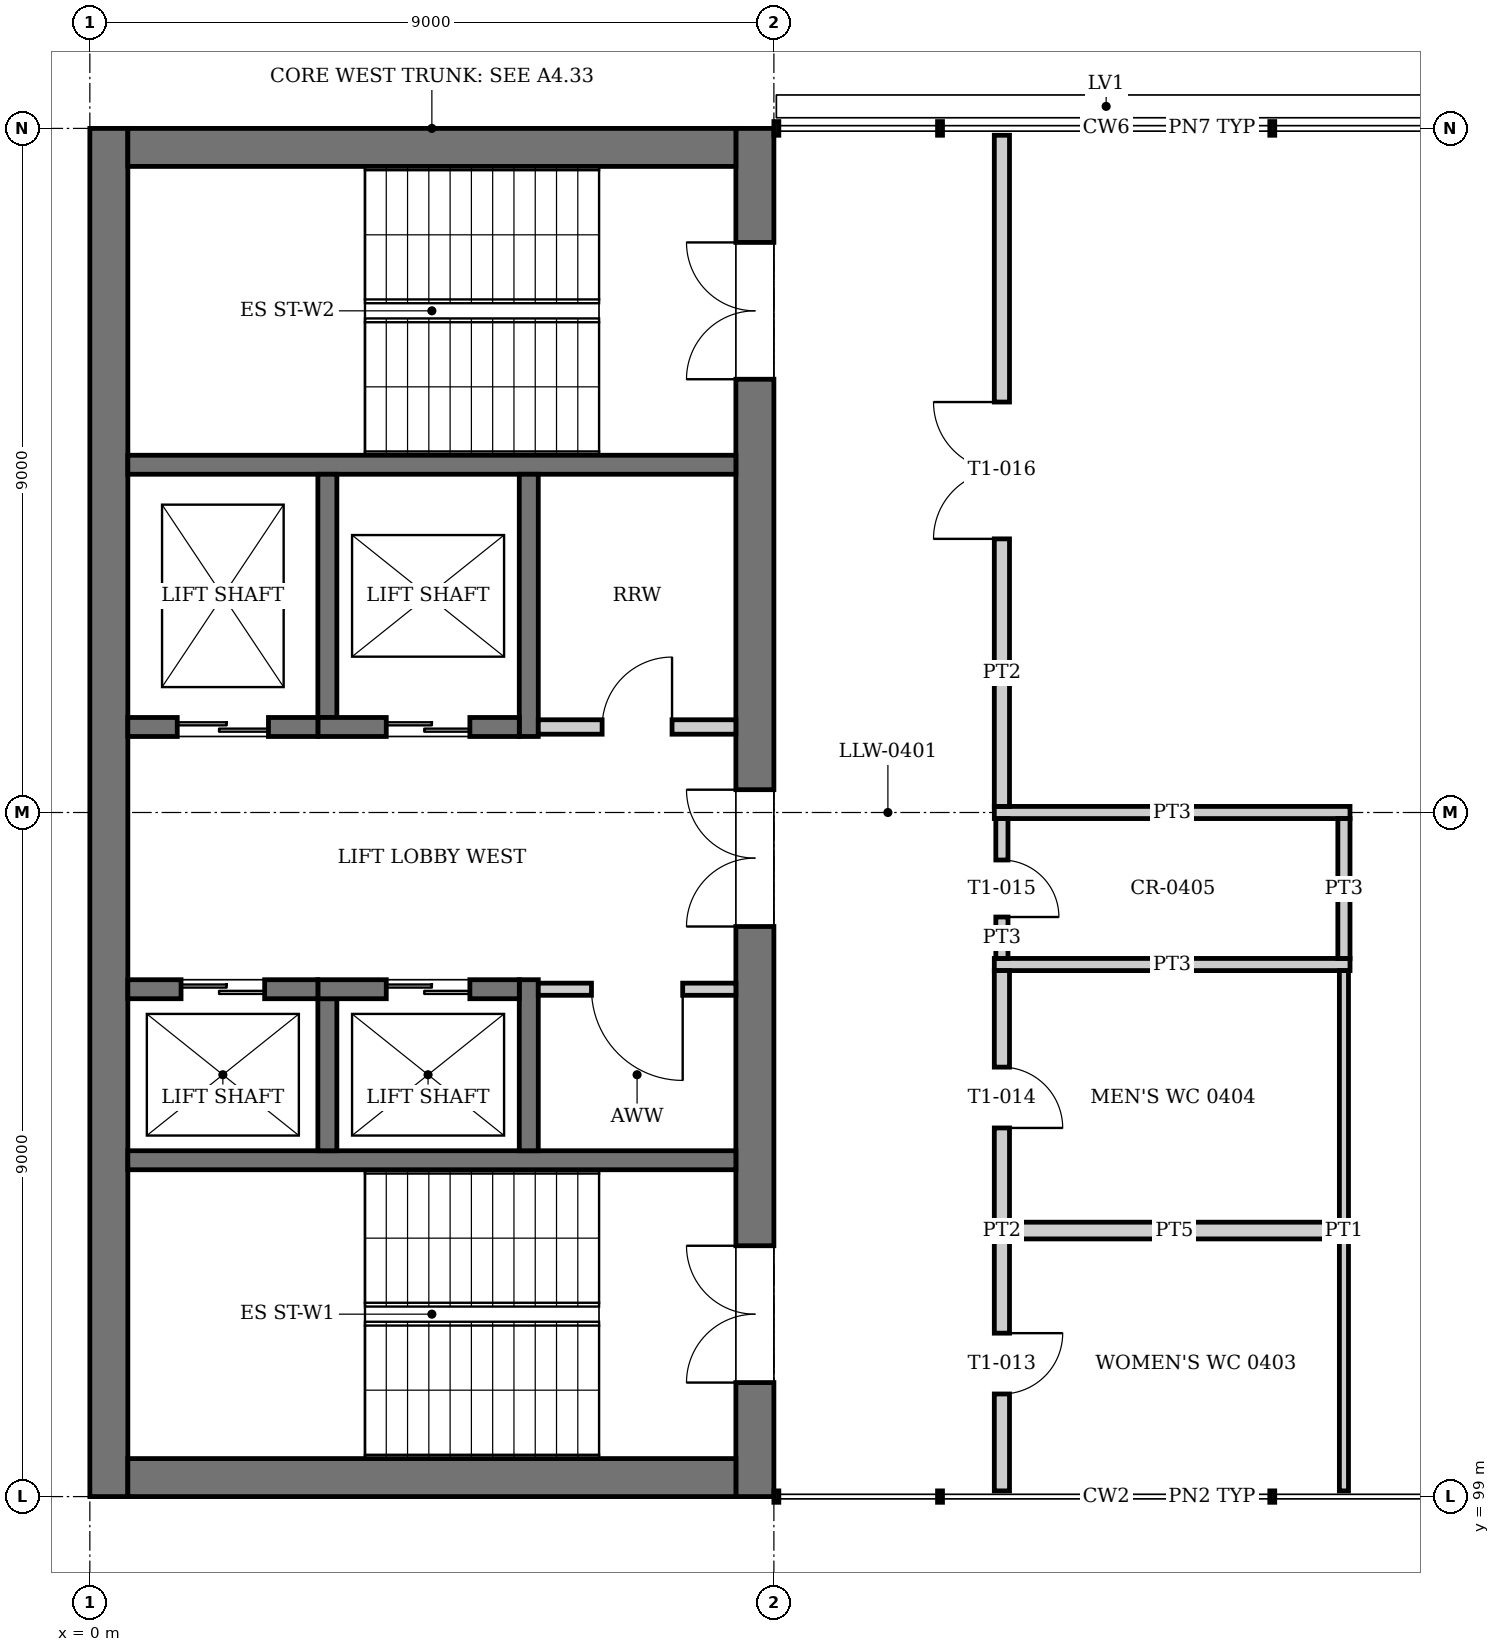
"""IFC4 building model, lengths in metres.
Left out: names, types, materials, properties, quantities, classifications, styles, units other than length and angle.
Written with IfcOpenShell. Run it as: python <this file> out.ifc"""

import sys

from ifc_helpers import new_model, si_unit, direction, frame, frame_2d, origin, place, context, subcontext, project, spatial, rectangle, extrude, element, fill, save


model = new_model("IFC4")
c1 = context("Model", 3, precision=1e-05, world=origin(), true_north=direction((0.0, 1.0)))
c2 = subcontext(c1, "Body", "Model", "MODEL_VIEW")
j1 = project(units=[si_unit("LENGTHUNIT", "METRE"), si_unit("PLANEANGLEUNIT", "RADIAN")], contexts=[c1])
p1 = place(None, origin())
s1 = spatial("IfcSite", under=j1, at=p1, CompositionType="ELEMENT")
p2 = place(p1, origin())
s2 = spatial("IfcBuilding", under=s1, at=p2, CompositionType="ELEMENT")
p3 = place(p2, frame((0.0, 0.0, 19.2)))
s3 = spatial("IfcBuildingStorey", under=s2, at=p3, CompositionType="ELEMENT", Elevation=19.2)
p4 = place(p3, frame((0.25, 99.0, 0.0), z_axis=(0.0, 0.0, 1.0), x_axis=(0.0, 1.0, 0.0)))
e1 = element("IfcWall", 1, at=p4, inside=s3, PredefinedType="SHEAR", context=c2, shape_type="SweptSolid", body=[
    extrude(rectangle(XDim=18.0, YDim=0.5, at=frame_2d((9.0, 0.0))), origin(), (0.0, 0.0, 1.0), 4.0),
])
p5 = place(p3, frame((8.75, 99.0, 0.0), z_axis=(0.0, 0.0, 1.0), x_axis=(0.0, 1.0, 0.0)))
e2 = element("IfcWall", 2, at=p5, inside=s3, PredefinedType="SHEAR", context=c2, shape_type="SweptSolid", body=[
    extrude(rectangle(XDim=18.0, YDim=0.5, at=frame_2d((9.0, 0.0))), origin(), (0.0, 0.0, 1.0), 4.0),
])
p6 = place(p5, frame((1.5, 0.0, 0.0)))
e3 = element("IfcOpeningElement", 3, at=p6, cuts=e2, PredefinedType="OPENING", context=c2, shape_type="SweptSolid", body=[
    extrude(rectangle(XDim=1.8, YDim=2.1, at=frame_2d((0.9, 1.05))), frame((0.0, 0.26, 0.0), z_axis=(0.0, -1.0, 0.0), x_axis=(1.0, 0.0, 0.0)), (0.0, 0.0, 1.0), 0.52),
])
p7 = place(p5, frame((14.7, 0.0, 0.0)))
e4 = element("IfcOpeningElement", 4, at=p7, cuts=e2, PredefinedType="OPENING", context=c2, shape_type="SweptSolid", body=[
    extrude(rectangle(XDim=1.8, YDim=2.1, at=frame_2d((0.9, 1.05))), frame((0.0, 0.26, 0.0), z_axis=(0.0, -1.0, 0.0), x_axis=(1.0, 0.0, 0.0)), (0.0, 0.0, 1.0), 0.52),
])
p8 = place(p5, frame((7.5, 0.0, 0.0)))
e5 = element("IfcOpeningElement", 5, at=p8, cuts=e2, PredefinedType="OPENING", context=c2, shape_type="SweptSolid", body=[
    extrude(rectangle(XDim=1.8, YDim=2.1, at=frame_2d((0.9, 1.05))), frame((0.0, 0.26, 0.0), z_axis=(0.0, -1.0, 0.0), x_axis=(1.0, 0.0, 0.0)), (0.0, 0.0, 1.0), 0.52),
])
for number, where, z_axis, x_axis in (
    (6, (0.5, 99.25, 0.0), (0.0, 0.0, 1.0), (1.0, 0.0, 0.0)),
    (7, (0.5, 116.75, 0.0), (0.0, 0.0, 1.0), (1.0, 0.0, 0.0)),
):
    element("IfcWall", number, at=place(p3, frame(where, z_axis=z_axis, x_axis=x_axis)), inside=s3, PredefinedType="SHEAR", context=c2, shape_type="SweptSolid", body=[
        extrude(rectangle(XDim=8.0, YDim=0.5, at=frame_2d((4.0, 0.0))), origin(), (0.0, 0.0, 1.0), 4.0),
    ])
for number, where, z_axis, x_axis in (
    (8, (8.5, 103.425, 0.0), (0.0, 0.0, 1.0), (-1.0, 0.0, 0.0)),
    (9, (8.5, 112.575, 0.0), (0.0, 0.0, 1.0), (-1.0, 0.0, 0.0)),
):
    element("IfcWall", number, at=place(p3, frame(where, z_axis=z_axis, x_axis=x_axis)), inside=s3, PredefinedType="SOLIDWALL", context=c2, shape_type="SweptSolid", body=[
        extrude(rectangle(XDim=8.0, YDim=0.25, at=frame_2d((4.0, 0.0))), origin(), (0.0, 0.0, 1.0), 3.75),
    ])
p9 = place(p3, frame((5.775, 103.55, 0.0), z_axis=(0.0, 0.0, 1.0), x_axis=(0.0, 1.0, 0.0)))
e10 = element("IfcWall", 10, at=p9, inside=s3, PredefinedType="SOLIDWALL", context=c2, shape_type="SweptSolid", body=[
    extrude(rectangle(XDim=2.25, YDim=0.25, at=frame_2d((1.125, 0.0))), origin(), (0.0, 0.0, 1.0), 4.0),
])
p10 = place(p3, frame((3.125, 103.55, 0.0), z_axis=(0.0, 0.0, 1.0), x_axis=(0.0, 1.0, 0.0)))
e11 = element("IfcWall", 11, at=p10, inside=s3, PredefinedType="SOLIDWALL", context=c2, shape_type="SweptSolid", body=[
    extrude(rectangle(XDim=2.0, YDim=0.25, at=frame_2d((1.0, 0.0))), origin(), (0.0, 0.0, 1.0), 4.0),
])
p11 = place(p3, frame((5.65, 105.675, 0.0), z_axis=(0.0, 0.0, 1.0), x_axis=(-1.0, 0.0, 0.0)))
e12 = element("IfcWall", 12, at=p11, inside=s3, PredefinedType="SOLIDWALL", context=c2, shape_type="SweptSolid", body=[
    extrude(rectangle(XDim=2.65, YDim=0.25, at=frame_2d((1.325, 0.0))), origin(), (0.0, 0.0, 1.0), 4.0),
])
p12 = place(p11, frame((0.65, 0.0, 0.0)))
e13 = element("IfcOpeningElement", 13, at=p12, cuts=e12, PredefinedType="OPENING", context=c2, shape_type="SweptSolid", body=[
    extrude(rectangle(XDim=1.1, YDim=2.1, at=frame_2d((0.55, 1.05))), frame((0.0, 0.135, 0.0), z_axis=(0.0, -1.0, 0.0), x_axis=(1.0, 0.0, 0.0)), (0.0, 0.0, 1.0), 0.27),
])
p13 = place(p3, frame((3.0, 105.675, 0.0), z_axis=(0.0, 0.0, 1.0), x_axis=(-1.0, 0.0, 0.0)))
e14 = element("IfcWall", 14, at=p13, inside=s3, PredefinedType="SOLIDWALL", context=c2, shape_type="SweptSolid", body=[
    extrude(rectangle(XDim=2.5, YDim=0.25, at=frame_2d((1.25, 0.0))), origin(), (0.0, 0.0, 1.0), 4.0),
])
p14 = place(p13, frame((0.7, 0.0, 0.0)))
e15 = element("IfcOpeningElement", 15, at=p14, cuts=e14, PredefinedType="OPENING", context=c2, shape_type="SweptSolid", body=[
    extrude(rectangle(XDim=1.1, YDim=2.1, at=frame_2d((0.55, 1.05))), frame((0.0, 0.135, 0.0), z_axis=(0.0, -1.0, 0.0), x_axis=(1.0, 0.0, 0.0)), (0.0, 0.0, 1.0), 0.27),
])
p15 = place(p3, frame((5.775, 109.0, 0.0), z_axis=(0.0, 0.0, 1.0), x_axis=(0.0, 1.0, 0.0)))
e16 = element("IfcWall", 16, at=p15, inside=s3, PredefinedType="SOLIDWALL", context=c2, shape_type="SweptSolid", body=[
    extrude(rectangle(XDim=3.45, YDim=0.25, at=frame_2d((1.725, 0.0))), origin(), (0.0, 0.0, 1.0), 4.0),
])
p16 = place(p3, frame((3.125, 109.25, 0.0), z_axis=(0.0, 0.0, 1.0), x_axis=(0.0, 1.0, 0.0)))
e17 = element("IfcWall", 17, at=p16, inside=s3, PredefinedType="SOLIDWALL", context=c2, shape_type="SweptSolid", body=[
    extrude(rectangle(XDim=3.2, YDim=0.25, at=frame_2d((1.6, 0.0))), origin(), (0.0, 0.0, 1.0), 4.0),
])
p17 = place(p3, frame((5.65, 109.125, 0.0), z_axis=(0.0, 0.0, 1.0), x_axis=(-1.0, 0.0, 0.0)))
e18 = element("IfcWall", 18, at=p17, inside=s3, PredefinedType="SOLIDWALL", context=c2, shape_type="SweptSolid", body=[
    extrude(rectangle(XDim=2.65, YDim=0.25, at=frame_2d((1.325, 0.0))), origin(), (0.0, 0.0, 1.0), 4.0),
])
p18 = place(p17, frame((0.65, 0.0, 0.0)))
e19 = element("IfcOpeningElement", 19, at=p18, cuts=e18, PredefinedType="OPENING", context=c2, shape_type="SweptSolid", body=[
    extrude(rectangle(XDim=1.1, YDim=2.1, at=frame_2d((0.55, 1.05))), frame((0.0, 0.135, 0.0), z_axis=(0.0, -1.0, 0.0), x_axis=(1.0, 0.0, 0.0)), (0.0, 0.0, 1.0), 0.27),
])
p19 = place(p3, frame((3.0, 109.125, 0.0), z_axis=(0.0, 0.0, 1.0), x_axis=(-1.0, 0.0, 0.0)))
e20 = element("IfcWall", 20, at=p19, inside=s3, PredefinedType="SOLIDWALL", context=c2, shape_type="SweptSolid", body=[
    extrude(rectangle(XDim=2.5, YDim=0.25, at=frame_2d((1.25, 0.0))), origin(), (0.0, 0.0, 1.0), 4.0),
])
p20 = place(p19, frame((0.65, 0.0, 0.0)))
e21 = element("IfcOpeningElement", 21, at=p20, cuts=e20, PredefinedType="OPENING", context=c2, shape_type="SweptSolid", body=[
    extrude(rectangle(XDim=1.2, YDim=2.1, at=frame_2d((0.6, 1.05))), frame((0.0, 0.135, 0.0), z_axis=(0.0, -1.0, 0.0), x_axis=(1.0, 0.0, 0.0)), (0.0, 0.0, 1.0), 0.27),
])
p21 = place(p3, frame((8.5, 105.675, 0.0), z_axis=(0.0, 0.0, 1.0), x_axis=(-1.0, 0.0, 0.0)))
e22 = element("IfcWall", 22, at=p21, inside=s3, PredefinedType="PARTITIONING", context=c2, shape_type="SweptSolid", body=[
    extrude(rectangle(XDim=2.6, YDim=0.16, at=frame_2d((1.3, 0.0))), origin(), (0.0, 0.0, 1.0), 3.75),
])
p22 = place(p21, frame((0.7, 0.0, 0.0)))
e23 = element("IfcOpeningElement", 23, at=p22, cuts=e22, PredefinedType="OPENING", context=c2, shape_type="SweptSolid", body=[
    extrude(rectangle(XDim=1.2, YDim=2.1, at=frame_2d((0.6, 1.05))), frame((0.0, 0.09, 0.0), z_axis=(0.0, -1.0, 0.0), x_axis=(1.0, 0.0, 0.0)), (0.0, 0.0, 1.0), 0.18),
])
p23 = place(p3, frame((8.5, 109.125, 0.0), z_axis=(0.0, 0.0, 1.0), x_axis=(-1.0, 0.0, 0.0)))
e24 = element("IfcWall", 24, at=p23, inside=s3, PredefinedType="PARTITIONING", context=c2, shape_type="SweptSolid", body=[
    extrude(rectangle(XDim=2.6, YDim=0.19, at=frame_2d((1.3, 0.0))), origin(), (0.0, 0.0, 1.0), 3.75),
])
p24 = place(p23, frame((0.84, 0.0, 0.0)))
e25 = element("IfcOpeningElement", 25, at=p24, cuts=e24, PredefinedType="OPENING", context=c2, shape_type="SweptSolid", body=[
    extrude(rectangle(XDim=0.92, YDim=2.1, at=frame_2d((0.46, 1.05))), frame((0.0, 0.105, 0.0), z_axis=(0.0, -1.0, 0.0), x_axis=(1.0, 0.0, 0.0)), (0.0, 0.0, 1.0), 0.21),
])
p25 = place(p3, frame((12.1, 102.5, 0.0), z_axis=(0.0, 0.0, 1.0), x_axis=(1.0, 0.0, 0.0)))
e26 = element("IfcWall", 26, at=p25, inside=s3, PredefinedType="PLUMBINGWALL", context=c2, shape_type="SweptSolid", body=[
    extrude(rectangle(XDim=4.34, YDim=0.22, at=frame_2d((2.17, 0.0))), origin(), (0.0, 0.0, 1.0), 3.05),
])
for number, where, z_axis, x_axis in (
    (27, (11.9, 106.0, 0.0), (0.0, 0.0, 1.0), (1.0, 0.0, 0.0)),
    (28, (11.9, 108.0, 0.0), (0.0, 0.0, 1.0), (1.0, 0.0, 0.0)),
):
    element("IfcWall", number, at=place(p3, frame(where, z_axis=z_axis, x_axis=x_axis)), inside=s3, PredefinedType="PARTITIONING", context=c2, shape_type="SweptSolid", body=[
        extrude(rectangle(XDim=4.68, YDim=0.16, at=frame_2d((2.34, 0.0))), origin(), (0.0, 0.0, 1.0), 3.05),
    ])
p26 = place(p3, frame((12.0, 99.075, 0.0), z_axis=(0.0, 0.0, 1.0), x_axis=(0.0, 1.0, 0.0)))
e29 = element("IfcWall", 29, at=p26, inside=s3, PredefinedType="PARTITIONING", context=c2, shape_type="SweptSolid", body=[
    extrude(rectangle(XDim=6.845, YDim=0.2, at=frame_2d((3.422, 0.0))), origin(), (0.0, 0.0, 1.0), 3.85),
])
p27 = place(p26, frame((1.275, 0.0, 0.0)))
e30 = element("IfcOpeningElement", 30, at=p27, cuts=e29, PredefinedType="OPENING", context=c2, shape_type="SweptSolid", body=[
    extrude(rectangle(XDim=0.8, YDim=2.1, at=frame_2d((0.4, 1.05))), frame((0.0, 0.11, 0.0), z_axis=(0.0, -1.0, 0.0), x_axis=(1.0, 0.0, 0.0)), (0.0, 0.0, 1.0), 0.22),
])
p28 = place(p26, frame((4.775, 0.0, 0.0)))
e31 = element("IfcOpeningElement", 31, at=p28, cuts=e29, PredefinedType="OPENING", context=c2, shape_type="SweptSolid", body=[
    extrude(rectangle(XDim=0.8, YDim=2.1, at=frame_2d((0.4, 1.05))), frame((0.0, 0.11, 0.0), z_axis=(0.0, -1.0, 0.0), x_axis=(1.0, 0.0, 0.0)), (0.0, 0.0, 1.0), 0.22),
])
p29 = place(p3, frame((12.0, 106.08, 0.0), z_axis=(0.0, 0.0, 1.0), x_axis=(0.0, 1.0, 0.0)))
e32 = element("IfcWall", 32, at=p29, inside=s3, PredefinedType="PARTITIONING", context=c2, shape_type="SweptSolid", body=[
    extrude(rectangle(XDim=1.84, YDim=0.16, at=frame_2d((0.92, 0.0))), origin(), (0.0, 0.0, 1.0), 3.85),
])
p30 = place(p29, frame((0.545, 0.0, 0.0)))
e33 = element("IfcOpeningElement", 33, at=p30, cuts=e32, PredefinedType="OPENING", context=c2, shape_type="SweptSolid", body=[
    extrude(rectangle(XDim=0.75, YDim=2.1, at=frame_2d((0.375, 1.05))), frame((0.0, 0.09, 0.0), z_axis=(0.0, -1.0, 0.0), x_axis=(1.0, 0.0, 0.0)), (0.0, 0.0, 1.0), 0.18),
])
p31 = place(p3, frame((12.0, 108.08, 0.0), z_axis=(0.0, 0.0, 1.0), x_axis=(0.0, 1.0, 0.0)))
e34 = element("IfcWall", 34, at=p31, inside=s3, PredefinedType="PARTITIONING", context=c2, shape_type="SweptSolid", body=[
    extrude(rectangle(XDim=8.83, YDim=0.2, at=frame_2d((4.415, 0.0))), origin(), (0.0, 0.0, 1.0), 3.85),
])
p32 = place(p31, frame((3.52, 0.0, 0.0)))
e35 = element("IfcOpeningElement", 35, at=p32, cuts=e34, PredefinedType="OPENING", context=c2, shape_type="SweptSolid", body=[
    extrude(rectangle(XDim=1.8, YDim=2.1, at=frame_2d((0.9, 1.05))), frame((0.0, 0.11, 0.0), z_axis=(0.0, -1.0, 0.0), x_axis=(1.0, 0.0, 0.0)), (0.0, 0.0, 1.0), 0.22),
])
p33 = place(p3, frame((16.5, 99.075, 0.0), z_axis=(0.0, 0.0, 1.0), x_axis=(0.0, 1.0, 0.0)))
e36 = element("IfcWall", 36, at=p33, inside=s3, PredefinedType="PARTITIONING", context=c2, shape_type="SweptSolid", body=[
    extrude(rectangle(XDim=6.845, YDim=0.12, at=frame_2d((3.422, 0.0))), origin(), (0.0, 0.0, 1.0), 3.85),
])
p34 = place(p3, frame((16.5, 106.08, 0.0), z_axis=(0.0, 0.0, 1.0), x_axis=(0.0, 1.0, 0.0)))
e37 = element("IfcWall", 37, at=p34, inside=s3, PredefinedType="PARTITIONING", context=c2, shape_type="SweptSolid", body=[
    extrude(rectangle(XDim=1.84, YDim=0.16, at=frame_2d((0.92, 0.0))), origin(), (0.0, 0.0, 1.0), 3.85),
])
p35 = place(p12, origin())
e38 = element("IfcDoor", 38, at=p35, inside=s3, OperationType="DOUBLE_DOOR_SLIDING", PredefinedType="DOOR", context=c2, shape_type="SweptSolid", body=[
    extrude(rectangle(XDim=1.1, YDim=2.1, at=frame_2d((0.55, 1.05))), frame((0.0, 0.025, 0.0), z_axis=(0.0, -1.0, 0.0), x_axis=(1.0, 0.0, 0.0)), (0.0, 0.0, 1.0), 0.05),
])
fill(e13, e38)
p36 = place(p14, origin())
e39 = element("IfcDoor", 39, at=p36, inside=s3, OperationType="DOUBLE_DOOR_SLIDING", PredefinedType="DOOR", context=c2, shape_type="SweptSolid", body=[
    extrude(rectangle(XDim=1.1, YDim=2.1, at=frame_2d((0.55, 1.05))), frame((0.0, 0.025, 0.0), z_axis=(0.0, -1.0, 0.0), x_axis=(1.0, 0.0, 0.0)), (0.0, 0.0, 1.0), 0.05),
])
fill(e15, e39)
p37 = place(p18, origin())
e40 = element("IfcDoor", 40, at=p37, inside=s3, OperationType="DOUBLE_DOOR_SLIDING", PredefinedType="DOOR", context=c2, shape_type="SweptSolid", body=[
    extrude(rectangle(XDim=1.1, YDim=2.1, at=frame_2d((0.55, 1.05))), frame((0.0, 0.025, 0.0), z_axis=(0.0, -1.0, 0.0), x_axis=(1.0, 0.0, 0.0)), (0.0, 0.0, 1.0), 0.05),
])
fill(e19, e40)
p38 = place(p20, origin())
e41 = element("IfcDoor", 41, at=p38, inside=s3, OperationType="DOUBLE_DOOR_SLIDING", PredefinedType="DOOR", context=c2, shape_type="SweptSolid", body=[
    extrude(rectangle(XDim=1.2, YDim=2.1, at=frame_2d((0.6, 1.05))), frame((0.0, 0.025, 0.0), z_axis=(0.0, -1.0, 0.0), x_axis=(1.0, 0.0, 0.0)), (0.0, 0.0, 1.0), 0.05),
])
fill(e21, e41)
p39 = place(p27, frame((0.8, 0.0, 0.0), z_axis=(0.0, 0.0, 1.0), x_axis=(-1.0, 0.0, 0.0)))
e42 = element("IfcDoor", 42, at=p39, inside=s3, OperationType="SINGLE_SWING_LEFT", PredefinedType="DOOR", context=c2, shape_type="SweptSolid", body=[
    extrude(rectangle(XDim=0.8, YDim=2.1, at=frame_2d((0.4, 1.05))), frame((0.0, 0.025, 0.0), z_axis=(0.0, -1.0, 0.0), x_axis=(1.0, 0.0, 0.0)), (0.0, 0.0, 1.0), 0.05),
])
fill(e30, e42)
p40 = place(p28, frame((0.8, 0.0, 0.0), z_axis=(0.0, 0.0, 1.0), x_axis=(-1.0, 0.0, 0.0)))
e43 = element("IfcDoor", 43, at=p40, inside=s3, OperationType="SINGLE_SWING_RIGHT", PredefinedType="DOOR", context=c2, shape_type="SweptSolid", body=[
    extrude(rectangle(XDim=0.8, YDim=2.1, at=frame_2d((0.4, 1.05))), frame((0.0, 0.025, 0.0), z_axis=(0.0, -1.0, 0.0), x_axis=(1.0, 0.0, 0.0)), (0.0, 0.0, 1.0), 0.05),
])
fill(e31, e43)
p41 = place(p30, frame((0.75, 0.0, 0.0), z_axis=(0.0, 0.0, 1.0), x_axis=(-1.0, 0.0, 0.0)))
e44 = element("IfcDoor", 44, at=p41, inside=s3, OperationType="SINGLE_SWING_RIGHT", PredefinedType="DOOR", context=c2, shape_type="SweptSolid", body=[
    extrude(rectangle(XDim=0.75, YDim=2.1, at=frame_2d((0.375, 1.05))), frame((0.0, 0.025, 0.0), z_axis=(0.0, -1.0, 0.0), x_axis=(1.0, 0.0, 0.0)), (0.0, 0.0, 1.0), 0.05),
])
fill(e33, e44)
p42 = place(p32, origin())
e45 = element("IfcDoor", 45, at=p42, inside=s3, OperationType="DOUBLE_DOOR_SINGLE_SWING", PredefinedType="DOOR", context=c2, shape_type="SweptSolid", body=[
    extrude(rectangle(XDim=1.8, YDim=2.1, at=frame_2d((0.9, 1.05))), frame((0.0, 0.025, 0.0), z_axis=(0.0, -1.0, 0.0), x_axis=(1.0, 0.0, 0.0)), (0.0, 0.0, 1.0), 0.05),
])
fill(e35, e45)
p43 = place(p6, origin())
e46 = element("IfcDoor", 46, at=p43, inside=s3, OperationType="DOUBLE_DOOR_SINGLE_SWING", PredefinedType="DOOR", context=c2, shape_type="SweptSolid", body=[
    extrude(rectangle(XDim=1.8, YDim=2.1, at=frame_2d((0.9, 1.05))), frame((0.0, 0.025, 0.0), z_axis=(0.0, -1.0, 0.0), x_axis=(1.0, 0.0, 0.0)), (0.0, 0.0, 1.0), 0.05),
])
fill(e3, e46)
p44 = place(p7, origin())
e47 = element("IfcDoor", 47, at=p44, inside=s3, OperationType="DOUBLE_DOOR_SINGLE_SWING", PredefinedType="DOOR", context=c2, shape_type="SweptSolid", body=[
    extrude(rectangle(XDim=1.8, YDim=2.1, at=frame_2d((0.9, 1.05))), frame((0.0, 0.025, 0.0), z_axis=(0.0, -1.0, 0.0), x_axis=(1.0, 0.0, 0.0)), (0.0, 0.0, 1.0), 0.05),
])
fill(e4, e47)
p45 = place(p8, origin())
e48 = element("IfcDoor", 48, at=p45, inside=s3, OperationType="DOUBLE_DOOR_SINGLE_SWING", PredefinedType="DOOR", context=c2, shape_type="SweptSolid", body=[
    extrude(rectangle(XDim=1.8, YDim=2.1, at=frame_2d((0.9, 1.05))), frame((0.0, 0.025, 0.0), z_axis=(0.0, -1.0, 0.0), x_axis=(1.0, 0.0, 0.0)), (0.0, 0.0, 1.0), 0.05),
])
fill(e5, e48)
p46 = place(p22, origin())
e49 = element("IfcDoor", 49, at=p46, inside=s3, OperationType="SINGLE_SWING_LEFT", PredefinedType="DOOR", context=c2, shape_type="SweptSolid", body=[
    extrude(rectangle(XDim=1.2, YDim=2.1, at=frame_2d((0.6, 1.05))), frame((0.0, 0.025, 0.0), z_axis=(0.0, -1.0, 0.0), x_axis=(1.0, 0.0, 0.0)), (0.0, 0.0, 1.0), 0.05),
])
fill(e23, e49)
p47 = place(p24, frame((0.92, 0.0, 0.0), z_axis=(0.0, 0.0, 1.0), x_axis=(-1.0, 0.0, 0.0)))
e50 = element("IfcDoor", 50, at=p47, inside=s3, OperationType="SINGLE_SWING_RIGHT", PredefinedType="DOOR", context=c2, shape_type="SweptSolid", body=[
    extrude(rectangle(XDim=0.92, YDim=2.1, at=frame_2d((0.46, 1.05))), frame((0.0, 0.025, 0.0), z_axis=(0.0, -1.0, 0.0), x_axis=(1.0, 0.0, 0.0)), (0.0, 0.0, 1.0), 0.05),
])
fill(e25, e50)
save(model, sys.argv[1])
